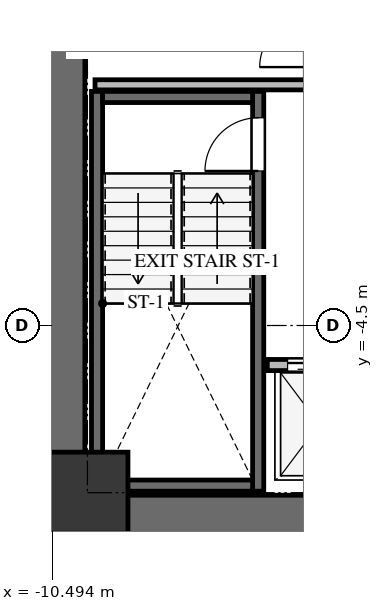
"""IFC4 building model, lengths in metres.
Left out: names, types, materials, properties, quantities, classifications, styles, units other than length and angle.
Written with IfcOpenShell. Run it as: python <this file> out.ifc"""

import sys

from ifc_helpers import new_model, si_unit, direction, frame, frame_2d, origin, origin_2d, place, context, subcontext, project, spatial, rectangle, extrude, source, transform, mapped, element, fill, save


model = new_model("IFC4")
c1 = context("Model", 3, precision=1e-05, world=origin(), true_north=direction((0.0, 1.0)))
c2 = subcontext(c1, "Body", "Model", "MODEL_VIEW")
j1 = project(units=[si_unit("LENGTHUNIT", "METRE"), si_unit("PLANEANGLEUNIT", "RADIAN")], contexts=[c1])
p1 = place(None, origin())
s1 = spatial("IfcSite", under=j1, at=p1, CompositionType="ELEMENT")
p2 = place(p1, origin())
s2 = spatial("IfcBuilding", under=s1, at=p2, CompositionType="ELEMENT")
p3 = place(p2, frame((0.0, 0.0, 45.6)))
s3 = spatial("IfcBuildingStorey", under=s2, at=p3, CompositionType="ELEMENT", Elevation=45.6)
p4 = place(p3, frame((-10.3, -8.75, 0.0), z_axis=(0.0, 0.0, 1.0), x_axis=(0.0, 1.0, 0.0)))
e1 = element("IfcWall", 1, at=p4, inside=s3, PredefinedType="SHEAR", context=c2, shape_type="SweptSolid", body=[
    extrude(rectangle(XDim=17.5, YDim=0.9, at=frame_2d((8.75, 0.0))), origin(), (0.0, 0.0, 1.0), 3.3),
])
p5 = place(p3, frame((-9.85, -8.3, 0.0), z_axis=(0.0, 0.0, 1.0), x_axis=(1.0, 0.0, 0.0)))
e2 = element("IfcWall", 2, at=p5, inside=s3, PredefinedType="SHEAR", context=c2, shape_type="SweptSolid", body=[
    extrude(rectangle(XDim=7.75, YDim=0.9, at=frame_2d((3.875, 0.0))), origin(), (0.0, 0.0, 1.0), 3.3),
])
p6 = place(p3, frame((-6.43, -7.77, -0.24), z_axis=(0.0, 0.0, 1.0), x_axis=(0.0, 1.0, 0.0)))
e3 = element("IfcWall", 3, at=p6, inside=s3, PredefinedType="SHEAR", context=c2, shape_type="SweptSolid", body=[
    extrude(rectangle(XDim=7.89, YDim=0.22, at=frame_2d((3.945, 0.0))), origin(), (0.0, 0.0, 1.0), 3.3),
])
p7 = place(p6, frame((6.32, 0.0, 0.0)))
e4 = element("IfcOpeningElement", 4, at=p7, cuts=e3, PredefinedType="OPENING", context=c2, shape_type="SweptSolid", body=[
    extrude(rectangle(XDim=1.05, YDim=2.15, at=frame_2d((0.525, 1.075))), frame((0.0, 0.12, 0.0), z_axis=(0.0, -1.0, 0.0), x_axis=(1.0, 0.0, 0.0)), (0.0, 0.0, 1.0), 0.24),
])
p8 = place(p3, frame((-9.61, 0.12, -0.24), z_axis=(0.0, 0.0, 1.0), x_axis=(0.0, -1.0, 0.0)))
e5 = element("IfcWall", 5, at=p8, inside=s3, PredefinedType="SHEAR", context=c2, shape_type="SweptSolid", body=[
    extrude(rectangle(XDim=7.89, YDim=0.22, at=frame_2d((3.945, 0.0))), origin(), (0.0, 0.0, 1.0), 3.3),
])
for number, where, z_axis, x_axis in (
    (6, (-9.5, -7.66, -0.24), (0.0, 0.0, 1.0), (1.0, 0.0, 0.0)),
    (7, (-6.54, 0.01, -0.24), (0.0, 0.0, 1.0), (-1.0, 0.0, 0.0)),
):
    element("IfcWall", number, at=place(p3, frame(where, z_axis=z_axis, x_axis=x_axis)), inside=s3, PredefinedType="SHEAR", context=c2, shape_type="SweptSolid", body=[
        extrude(rectangle(XDim=2.96, YDim=0.22, at=frame_2d((1.48, 0.0))), origin(), (0.0, 0.0, 1.0), 3.3),
    ])
m1 = source(origin(), c2, "Body", "SweptSolid", [
    extrude(rectangle(XDim=1.6, YDim=1.6, at=origin_2d()), origin(), (0.0, 0.0, 1.0), 3.3),
])
p9 = place(p3, frame((-9.8, -7.8, -0.24), z_axis=(0.0, 0.0, 1.0), x_axis=(1.0, 0.0, 0.0)))
e8 = element("IfcColumn", 8, at=p9, inside=s3, PredefinedType="COLUMN", context=c2, shape_type="MappedRepresentation", body=[
    mapped(m1, transform((0.0, 0.0, 0.0), x_axis=(1.0, 0.0, 0.0), y_axis=(0.0, 1.0, 0.0), z_axis=(0.0, 0.0, 1.0), scale=1.0)),
])
p10 = place(p3, frame((-9.65, 0.25, 0.0), z_axis=(0.0, 0.0, 1.0), x_axis=(1.0, 0.0, 0.0)))
e9 = element("IfcWall", 9, at=p10, inside=s3, PredefinedType="SOLIDWALL", context=c2, shape_type="SweptSolid", body=[
    extrude(rectangle(XDim=4.27, YDim=0.2, at=frame_2d((2.135, 0.0))), origin(), (0.0, 0.0, 1.0), 3.045),
])
p11 = place(p3, frame((-6.25, -5.28, 0.0), z_axis=(0.0, 0.0, 1.0), x_axis=(1.0, 0.0, 0.0)))
e10 = element("IfcWall", 10, at=p11, inside=s3, PredefinedType="SOLIDWALL", context=c2, shape_type="SweptSolid", body=[
    extrude(rectangle(XDim=3.9, YDim=0.22, at=frame_2d((1.95, 0.0))), origin(), (0.0, 0.0, 1.0), 3.045),
])
p12 = place(p11, frame((0.4, 0.0, 0.0)))
e11 = element("IfcOpeningElement", 11, at=p12, cuts=e10, PredefinedType="OPENING", context=c2, shape_type="SweptSolid", body=[
    extrude(rectangle(XDim=1.1, YDim=2.15, at=frame_2d((0.55, 1.075))), frame((0.0, 0.12, 0.0), z_axis=(0.0, -1.0, 0.0), x_axis=(1.0, 0.0, 0.0)), (0.0, 0.0, 1.0), 0.24),
])
p13 = place(p11, frame((2.25, 0.0, 0.0)))
e12 = element("IfcOpeningElement", 12, at=p13, cuts=e10, PredefinedType="OPENING", context=c2, shape_type="SweptSolid", body=[
    extrude(rectangle(XDim=1.1, YDim=2.15, at=frame_2d((0.55, 1.075))), frame((0.0, 0.12, 0.0), z_axis=(0.0, -1.0, 0.0), x_axis=(1.0, 0.0, 0.0)), (0.0, 0.0, 1.0), 0.24),
])
m2 = source(origin(), c2, "Body", "SweptSolid", [
    extrude(rectangle(XDim=1.05, YDim=2.15, at=frame_2d((0.525, 1.075))), frame((0.0, 0.025, 0.0), z_axis=(0.0, -1.0, 0.0), x_axis=(1.0, 0.0, 0.0)), (0.0, 0.0, 1.0), 0.05),
])
p14 = place(p7, origin())
e13 = element("IfcDoor", 13, at=p14, inside=s3, OperationType="SINGLE_SWING_LEFT", PredefinedType="DOOR", context=c2, shape_type="MappedRepresentation", body=[
    mapped(m2, transform((0.0, 0.0, 0.0), x_axis=(1.0, 0.0, 0.0), y_axis=(0.0, 1.0, 0.0), z_axis=(0.0, 0.0, 1.0), scale=1.0)),
])
fill(e4, e13)
m3 = source(origin(), c2, "Body", "SweptSolid", [
    extrude(rectangle(XDim=1.1, YDim=2.15, at=frame_2d((0.55, 1.075))), frame((0.0, 0.025, 0.0), z_axis=(0.0, -1.0, 0.0), x_axis=(1.0, 0.0, 0.0)), (0.0, 0.0, 1.0), 0.05),
])
p15 = place(p12, origin())
e14 = element("IfcDoor", 14, at=p15, inside=s3, OperationType="DOUBLE_DOOR_SLIDING", PredefinedType="DOOR", context=c2, shape_type="MappedRepresentation", body=[
    mapped(m3, transform((0.0, 0.0, 0.0), x_axis=(1.0, 0.0, 0.0), y_axis=(0.0, 1.0, 0.0), z_axis=(0.0, 0.0, 1.0), scale=1.0)),
])
fill(e11, e14)
save(model, sys.argv[1])
